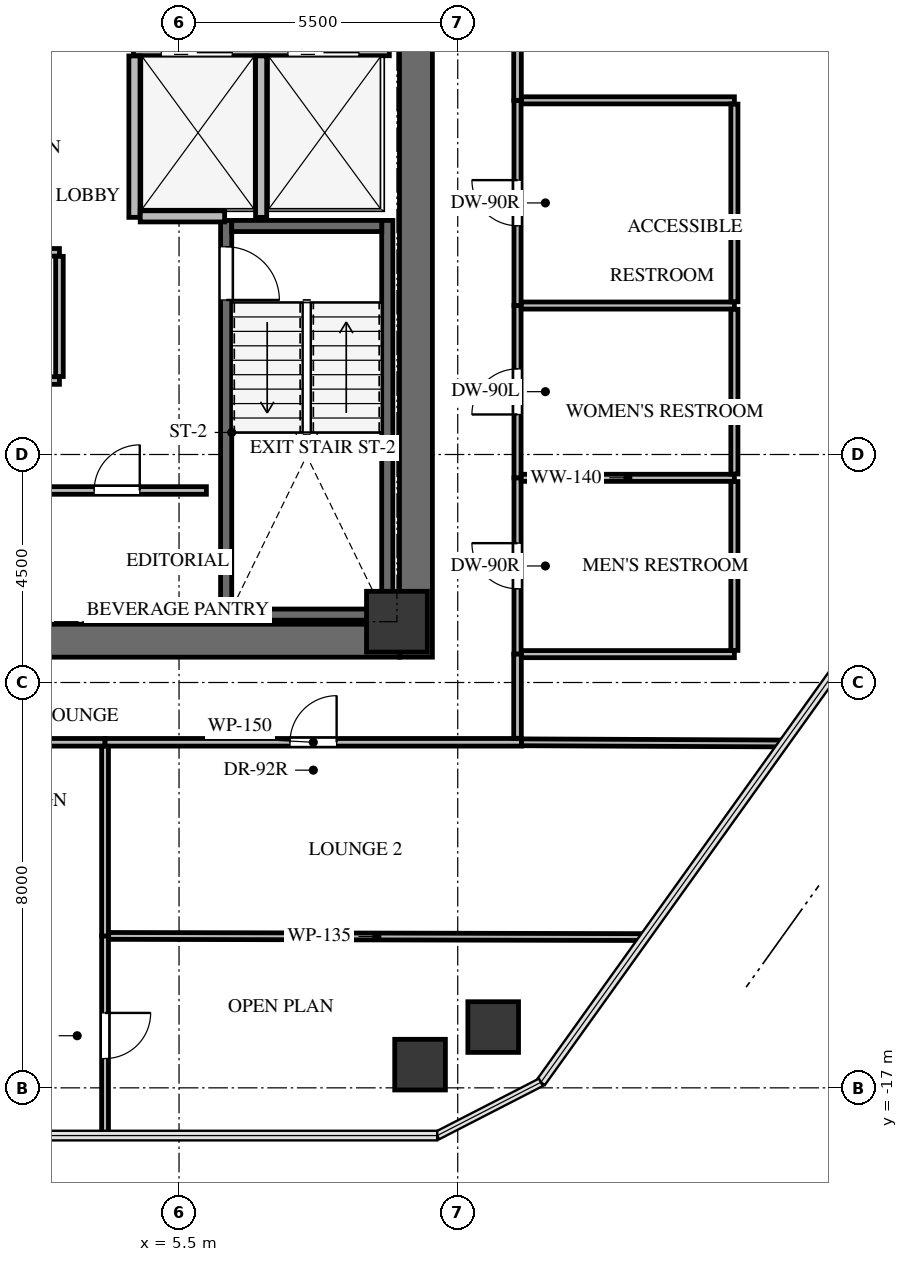
"""IFC4 building model, lengths in metres.
Left out: names, types, materials, properties, quantities, classifications, styles, units other than length and angle.
Written with IfcOpenShell. Run it as: python <this file> out.ifc"""

import sys

from ifc_helpers import new_model, si_unit, direction, frame, frame_2d, origin, origin_2d, place, context, subcontext, project, spatial, rectangle, extrude, source, transform, mapped, element, fill, save


model = new_model("IFC4")
c1 = context("Model", 3, precision=1e-05, world=origin(), true_north=direction((0.0, 1.0)))
c2 = subcontext(c1, "Body", "Model", "MODEL_VIEW")
j1 = project(units=[si_unit("LENGTHUNIT", "METRE"), si_unit("PLANEANGLEUNIT", "RADIAN")], contexts=[c1])
p1 = place(None, origin())
s1 = spatial("IfcSite", under=j1, at=p1, CompositionType="ELEMENT")
p2 = place(p1, origin())
s2 = spatial("IfcBuilding", under=s1, at=p2, CompositionType="ELEMENT")
p3 = place(p2, frame((0.0, 0.0, 183.7)))
s3 = spatial("IfcBuildingStorey", under=s2, at=p3, CompositionType="ELEMENT", Elevation=183.7)
p4 = place(p3, frame((10.175, -8.5, 0.0), z_axis=(0.0, 0.0, 1.0), x_axis=(0.0, 1.0, 0.0)))
e1 = element("IfcWall", 1, at=p4, inside=s3, PredefinedType="SHEAR", context=c2, shape_type="SweptSolid", body=[
    extrude(rectangle(XDim=17.0, YDim=0.65, at=frame_2d((8.5, 0.0))), origin(), (0.0, 0.0, 1.0), 3.3),
])
p5 = place(p3, frame((2.1, -8.175, 0.0), z_axis=(0.0, 0.0, 1.0), x_axis=(1.0, 0.0, 0.0)))
e2 = element("IfcWall", 2, at=p5, inside=s3, PredefinedType="SHEAR", context=c2, shape_type="SweptSolid", body=[
    extrude(rectangle(XDim=7.75, YDim=0.65, at=frame_2d((3.875, 0.0))), origin(), (0.0, 0.0, 1.0), 3.3),
])
p6 = place(p3, frame((9.61, -7.77, -0.24), z_axis=(0.0, 0.0, 1.0), x_axis=(0.0, 1.0, 0.0)))
e3 = element("IfcWall", 3, at=p6, inside=s3, PredefinedType="SHEAR", context=c2, shape_type="SweptSolid", body=[
    extrude(rectangle(XDim=7.89, YDim=0.22, at=frame_2d((3.945, 0.0))), origin(), (0.0, 0.0, 1.0), 3.3),
])
p7 = place(p3, frame((6.43, 0.12, -0.24), z_axis=(0.0, 0.0, 1.0), x_axis=(0.0, -1.0, 0.0)))
e4 = element("IfcWall", 4, at=p7, inside=s3, PredefinedType="SHEAR", context=c2, shape_type="SweptSolid", body=[
    extrude(rectangle(XDim=7.89, YDim=0.22, at=frame_2d((3.945, 0.0))), origin(), (0.0, 0.0, 1.0), 3.3),
])
p8 = place(p7, frame((0.52, 0.0, 0.0)))
e5 = element("IfcOpeningElement", 5, at=p8, cuts=e4, PredefinedType="OPENING", context=c2, shape_type="SweptSolid", body=[
    extrude(rectangle(XDim=1.05, YDim=2.15, at=frame_2d((0.525, 1.075))), frame((0.0, 0.12, 0.0), z_axis=(0.0, -1.0, 0.0), x_axis=(1.0, 0.0, 0.0)), (0.0, 0.0, 1.0), 0.24),
])
for number, where, z_axis, x_axis in (
    (6, (6.54, -7.66, -0.24), (0.0, 0.0, 1.0), (1.0, 0.0, 0.0)),
    (7, (9.5, 0.01, -0.24), (0.0, 0.0, 1.0), (-1.0, 0.0, 0.0)),
):
    element("IfcWall", number, at=place(p3, frame(where, z_axis=z_axis, x_axis=x_axis)), inside=s3, PredefinedType="SHEAR", context=c2, shape_type="SweptSolid", body=[
        extrude(rectangle(XDim=2.96, YDim=0.22, at=frame_2d((1.48, 0.0))), origin(), (0.0, 0.0, 1.0), 3.3),
    ])
m1 = source(origin(), c2, "Body", "SweptSolid", [
    extrude(rectangle(XDim=1.2, YDim=1.2, at=origin_2d()), origin(), (0.0, 0.0, 1.0), 3.3),
])
p9 = place(p3, frame((9.8, -7.8, -0.24), z_axis=(0.0, 0.0, 1.0), x_axis=(1.0, 0.0, 0.0)))
e8 = element("IfcColumn", 8, at=p9, inside=s3, PredefinedType="COLUMN", context=c2, shape_type="MappedRepresentation", body=[
    mapped(m1, transform((0.0, 0.0, 0.0), x_axis=(1.0, 0.0, 0.0), y_axis=(0.0, 1.0, 0.0), z_axis=(0.0, 0.0, 1.0), scale=1.0)),
])
m2 = source(origin(), c2, "Body", "SweptSolid", [
    extrude(rectangle(XDim=1.0, YDim=1.0, at=origin_2d()), origin(), (0.0, 0.0, 1.0), 3.3),
])
for number, where, z_axis, x_axis in (
    (9, (11.7, -15.8, -0.24), (0.0, 0.0, 1.0), (1.0, 0.0, 0.0)),
    (10, (10.257, -16.542, -0.24), (0.0, 0.0, 1.0), (1.0, 0.0, 0.0)),
):
    element("IfcColumn", number, at=place(p3, frame(where, z_axis=z_axis, x_axis=x_axis)), inside=s3, PredefinedType="COLUMN", context=c2, shape_type="MappedRepresentation", body=[
        mapped(m2, transform((0.0, 0.0, 0.0), x_axis=(1.0, 0.0, 0.0), y_axis=(0.0, 1.0, 0.0), z_axis=(0.0, 0.0, 1.0), scale=1.0)),
    ])
p10 = place(p3, frame((4.6, 3.48, 0.0), z_axis=(0.0, 0.0, 1.0), x_axis=(1.0, 0.0, 0.0)))
e11 = element("IfcWall", 11, at=p10, inside=s3, PredefinedType="SOLIDWALL", context=c2, shape_type="SweptSolid", body=[
    extrude(rectangle(XDim=5.05, YDim=0.22, at=frame_2d((2.525, 0.0))), origin(), (0.0, 0.0, 1.0), 3.045),
])
p11 = place(p10, frame((0.55, 0.0, 0.0)))
e12 = element("IfcOpeningElement", 12, at=p11, cuts=e11, PredefinedType="OPENING", context=c2, shape_type="SweptSolid", body=[
    extrude(rectangle(XDim=1.4, YDim=2.15, at=frame_2d((0.7, 1.075))), frame((0.0, 0.12, 0.0), z_axis=(0.0, -1.0, 0.0), x_axis=(1.0, 0.0, 0.0)), (0.0, 0.0, 1.0), 0.24),
])
p12 = place(p10, frame((3.05, 0.0, 0.0)))
e13 = element("IfcOpeningElement", 13, at=p12, cuts=e11, PredefinedType="OPENING", context=c2, shape_type="SweptSolid", body=[
    extrude(rectangle(XDim=1.4, YDim=2.15, at=frame_2d((0.7, 1.075))), frame((0.0, 0.12, 0.0), z_axis=(0.0, -1.0, 0.0), x_axis=(1.0, 0.0, 0.0)), (0.0, 0.0, 1.0), 0.24),
])
for number, where, z_axis, x_axis in (
    (14, (4.62, 0.18, 0.0), (0.0, 0.0, 1.0), (0.0, 1.0, 0.0)),
    (15, (7.12, 0.18, 0.0), (0.0, 0.0, 1.0), (0.0, 1.0, 0.0)),
):
    element("IfcWall", number, at=place(p3, frame(where, z_axis=z_axis, x_axis=x_axis)), inside=s3, PredefinedType="SOLIDWALL", context=c2, shape_type="SweptSolid", body=[
        extrude(rectangle(XDim=3.186, YDim=0.22, at=frame_2d((1.593, 0.0))), origin(), (0.0, 0.0, 1.0), 3.045),
    ])
p13 = place(p3, frame((4.734, 0.2, 0.0), z_axis=(0.0, 0.0, 1.0), x_axis=(1.0, 0.0, 0.0)))
e16 = element("IfcWall", 16, at=p13, inside=s3, PredefinedType="SOLIDWALL", context=c2, shape_type="SweptSolid", body=[
    extrude(rectangle(XDim=1.666, YDim=0.22, at=frame_2d((0.833, 0.0))), origin(), (0.0, 0.0, 1.0), 3.045),
])
p14 = place(p3, frame((2.51, -5.21, 0.0), z_axis=(0.0, 0.0, 1.0), x_axis=(1.0, 0.0, 0.0)))
e17 = element("IfcWall", 17, at=p14, inside=s3, PredefinedType="PARTITIONING", context=c2, shape_type="SweptSolid", body=[
    extrude(rectangle(XDim=3.53, YDim=0.15, at=frame_2d((1.765, 0.0))), origin(), (0.0, 0.0, 1.0), 3.045),
])
p15 = place(p14, frame((1.315, 0.0, 0.0)))
e18 = element("IfcOpeningElement", 18, at=p15, cuts=e17, PredefinedType="OPENING", context=c2, shape_type="SweptSolid", body=[
    extrude(rectangle(XDim=0.9, YDim=2.05, at=frame_2d((0.45, 1.025))), frame((0.0, 0.085, 0.0), z_axis=(0.0, -1.0, 0.0), x_axis=(1.0, 0.0, 0.0)), (0.0, 0.0, 1.0), 0.17),
])
p16 = place(p3, frame((3.14, -3.04, 0.0), z_axis=(0.0, 0.0, 1.0), x_axis=(-1.0, 0.0, 0.0)))
e19 = element("IfcWall", 19, at=p16, inside=s3, PredefinedType="PARTITIONING", context=c2, shape_type="SweptSolid", body=[
    extrude(rectangle(XDim=3.73, YDim=0.15, at=frame_2d((1.865, 0.0))), origin(), (0.0, 0.0, 1.0), 3.045),
])
p17 = place(p16, frame((1.415, 0.0, 0.0)))
e20 = element("IfcOpeningElement", 20, at=p17, cuts=e19, PredefinedType="OPENING", context=c2, shape_type="SweptSolid", body=[
    extrude(rectangle(XDim=0.9, YDim=2.05, at=frame_2d((0.45, 1.025))), frame((0.0, 0.085, 0.0), z_axis=(0.0, -1.0, 0.0), x_axis=(1.0, 0.0, 0.0)), (0.0, 0.0, 1.0), 0.17),
])
p18 = place(p3, frame((-0.59, -0.51, 0.0), z_axis=(0.0, 0.0, 1.0), x_axis=(1.0, 0.0, 0.0)))
e21 = element("IfcWall", 21, at=p18, inside=s3, PredefinedType="PARTITIONING", context=c2, shape_type="SweptSolid", body=[
    extrude(rectangle(XDim=3.73, YDim=0.15, at=frame_2d((1.865, 0.0))), origin(), (0.0, 0.0, 1.0), 3.045),
])
p19 = place(p3, frame((3.14, -0.589, 0.0), z_axis=(0.0, 0.0, 1.0), x_axis=(0.0, -1.0, 0.0)))
e22 = element("IfcWall", 22, at=p19, inside=s3, PredefinedType="PARTITIONING", context=c2, shape_type="SweptSolid", body=[
    extrude(rectangle(XDim=2.372, YDim=0.15, at=frame_2d((1.186, 0.0))), origin(), (0.0, 0.0, 1.0), 3.045),
])
p20 = place(p3, frame((12.18, -8.44, 0.0), z_axis=(0.0, 0.0, 1.0), x_axis=(0.0, 1.0, 0.0)))
e23 = element("IfcWall", 23, at=p20, inside=s3, PredefinedType="PARTITIONING", context=c2, shape_type="SweptSolid", body=[
    extrude(rectangle(XDim=3.48, YDim=0.14, at=frame_2d((1.74, 0.0))), origin(), (0.0, 0.0, 1.0), 3.045),
])
p21 = place(p20, frame((1.29, 0.0, 0.0)))
e24 = element("IfcOpeningElement", 24, at=p21, cuts=e23, PredefinedType="OPENING", context=c2, shape_type="SweptSolid", body=[
    extrude(rectangle(XDim=0.9, YDim=2.05, at=frame_2d((0.45, 1.025))), frame((0.0, 0.08, 0.0), z_axis=(0.0, -1.0, 0.0), x_axis=(1.0, 0.0, 0.0)), (0.0, 0.0, 1.0), 0.16),
])
p22 = place(p3, frame((12.18, -4.96, 0.0), z_axis=(0.0, 0.0, 1.0), x_axis=(0.0, 1.0, 0.0)))
e25 = element("IfcWall", 25, at=p22, inside=s3, PredefinedType="PARTITIONING", context=c2, shape_type="SweptSolid", body=[
    extrude(rectangle(XDim=3.4, YDim=0.14, at=frame_2d((1.7, 0.0))), origin(), (0.0, 0.0, 1.0), 3.045),
])
p23 = place(p22, frame((1.25, 0.0, 0.0)))
e26 = element("IfcOpeningElement", 26, at=p23, cuts=e25, PredefinedType="OPENING", context=c2, shape_type="SweptSolid", body=[
    extrude(rectangle(XDim=0.9, YDim=2.05, at=frame_2d((0.45, 1.025))), frame((0.0, 0.08, 0.0), z_axis=(0.0, -1.0, 0.0), x_axis=(1.0, 0.0, 0.0)), (0.0, 0.0, 1.0), 0.16),
])
p24 = place(p3, frame((12.18, -1.56, 0.0), z_axis=(0.0, 0.0, 1.0), x_axis=(0.0, 1.0, 0.0)))
e27 = element("IfcWall", 27, at=p24, inside=s3, PredefinedType="PARTITIONING", context=c2, shape_type="SweptSolid", body=[
    extrude(rectangle(XDim=4.05, YDim=0.14, at=frame_2d((2.025, 0.0))), origin(), (0.0, 0.0, 1.0), 2.242),
])
p25 = place(p24, frame((1.575, 0.0, 0.0)))
e28 = element("IfcOpeningElement", 28, at=p25, cuts=e27, PredefinedType="OPENING", context=c2, shape_type="SweptSolid", body=[
    extrude(rectangle(XDim=0.9, YDim=2.05, at=frame_2d((0.45, 1.025))), frame((0.0, 0.08, 0.0), z_axis=(0.0, -1.0, 0.0), x_axis=(1.0, 0.0, 0.0)), (0.0, 0.0, 1.0), 0.16),
])
p26 = place(p3, frame((1.089, -10.18, 0.0), z_axis=(0.0, 0.0, 1.0), x_axis=(1.0, 0.0, 0.0)))
e29 = element("IfcWall", 29, at=p26, inside=s3, PredefinedType="PARTITIONING", context=c2, shape_type="SweptSolid", body=[
    extrude(rectangle(XDim=2.951, YDim=0.15, at=frame_2d((1.476, 0.0))), origin(), (0.0, 0.0, 1.0), 3.045),
])
p27 = place(p3, frame((4.04, -10.18, 0.0), z_axis=(0.0, 0.0, 1.0), x_axis=(1.0, 0.0, 0.0)))
e30 = element("IfcWall", 30, at=p27, inside=s3, PredefinedType="PARTITIONING", context=c2, shape_type="SweptSolid", body=[
    extrude(rectangle(XDim=8.22, YDim=0.15, at=frame_2d((4.11, 0.0))), origin(), (0.0, 0.0, 1.0), 2.242),
])
p28 = place(p27, frame((3.65, 0.0, 0.0)))
e31 = element("IfcOpeningElement", 31, at=p28, cuts=e30, PredefinedType="OPENING", context=c2, shape_type="SweptSolid", body=[
    extrude(rectangle(XDim=0.92, YDim=2.1, at=frame_2d((0.46, 1.05))), frame((0.0, 0.085, 0.0), z_axis=(0.0, -1.0, 0.0), x_axis=(1.0, 0.0, 0.0)), (0.0, 0.0, 1.0), 0.17),
])
p29 = place(p3, frame((12.18, 2.49, 0.0), z_axis=(0.0, 0.0, 1.0), x_axis=(0.0, 1.0, 0.0)))
e32 = element("IfcWall", 32, at=p29, inside=s3, PredefinedType="PARTITIONING", context=c2, shape_type="SweptSolid", body=[
    extrude(rectangle(XDim=7.611, YDim=0.15, at=frame_2d((3.806, 0.0))), origin(), (0.0, 0.0, 1.0), 3.045),
])
p30 = place(p29, frame((3.331, 0.0, 0.0)))
e33 = element("IfcOpeningElement", 33, at=p30, cuts=e32, PredefinedType="OPENING", context=c2, shape_type="SweptSolid", body=[
    extrude(rectangle(XDim=0.95, YDim=2.1, at=frame_2d((0.475, 1.05))), frame((0.0, 0.085, 0.0), z_axis=(0.0, -1.0, 0.0), x_axis=(1.0, 0.0, 0.0)), (0.0, 0.0, 1.0), 0.17),
])
p31 = place(p3, frame((12.18, -10.101, 0.0), z_axis=(0.0, 0.0, 1.0), x_axis=(0.0, 1.0, 0.0)))
e34 = element("IfcWall", 34, at=p31, inside=s3, PredefinedType="PARTITIONING", context=c2, shape_type="SweptSolid", body=[
    extrude(rectangle(XDim=1.661, YDim=0.15, at=frame_2d((0.831, 0.0))), origin(), (0.0, 0.0, 1.0), 3.045),
])
p32 = place(p3, frame((12.254, -4.96, 0.0), z_axis=(0.0, 0.0, 1.0), x_axis=(1.0, 0.0, 0.0)))
e35 = element("IfcWall", 35, at=p32, inside=s3, PredefinedType="PARTITIONING", context=c2, shape_type="SweptSolid", body=[
    extrude(rectangle(XDim=4.206, YDim=0.14, at=frame_2d((2.103, 0.0))), origin(), (0.0, 0.0, 1.0), 3.045),
])
p33 = place(p3, frame((16.46, -8.44, 0.0), z_axis=(0.0, 0.0, 1.0), x_axis=(-1.0, 0.0, 0.0)))
e36 = element("IfcWall", 36, at=p33, inside=s3, PredefinedType="PARTITIONING", context=c2, shape_type="SweptSolid", body=[
    extrude(rectangle(XDim=4.201, YDim=0.14, at=frame_2d((2.101, 0.0))), origin(), (0.0, 0.0, 1.0), 3.045),
])
p34 = place(p3, frame((16.46, -5.034, 0.0), z_axis=(0.0, 0.0, 1.0), x_axis=(0.0, -1.0, 0.0)))
e37 = element("IfcWall", 37, at=p34, inside=s3, PredefinedType="PARTITIONING", context=c2, shape_type="SweptSolid", body=[
    extrude(rectangle(XDim=3.332, YDim=0.14, at=frame_2d((1.666, 0.0))), origin(), (0.0, 0.0, 1.0), 3.045),
])
p35 = place(p3, frame((12.254, -1.56, 0.0), z_axis=(0.0, 0.0, 1.0), x_axis=(1.0, 0.0, 0.0)))
e38 = element("IfcWall", 38, at=p35, inside=s3, PredefinedType="PARTITIONING", context=c2, shape_type="SweptSolid", body=[
    extrude(rectangle(XDim=4.206, YDim=0.14, at=frame_2d((2.103, 0.0))), origin(), (0.0, 0.0, 1.0), 3.045),
])
p36 = place(p3, frame((16.46, -1.634, 0.0), z_axis=(0.0, 0.0, 1.0), x_axis=(0.0, -1.0, 0.0)))
e39 = element("IfcWall", 39, at=p36, inside=s3, PredefinedType="PARTITIONING", context=c2, shape_type="SweptSolid", body=[
    extrude(rectangle(XDim=3.252, YDim=0.14, at=frame_2d((1.626, 0.0))), origin(), (0.0, 0.0, 1.0), 3.045),
])
p37 = place(p3, frame((12.259, 2.49, 0.0), z_axis=(0.0, 0.0, 1.0), x_axis=(1.0, 0.0, 0.0)))
e40 = element("IfcWall", 40, at=p37, inside=s3, PredefinedType="PARTITIONING", context=c2, shape_type="SweptSolid", body=[
    extrude(rectangle(XDim=4.201, YDim=0.14, at=frame_2d((2.101, 0.0))), origin(), (0.0, 0.0, 1.0), 3.045),
])
p38 = place(p3, frame((16.46, 2.416, 0.0), z_axis=(0.0, 0.0, 1.0), x_axis=(0.0, -1.0, 0.0)))
e41 = element("IfcWall", 41, at=p38, inside=s3, PredefinedType="PARTITIONING", context=c2, shape_type="SweptSolid", body=[
    extrude(rectangle(XDim=3.902, YDim=0.14, at=frame_2d((1.951, 0.0))), origin(), (0.0, 0.0, 1.0), 2.242),
])
p39 = place(p3, frame((4.04, -14.001, 0.0), z_axis=(0.0, 0.0, 1.0), x_axis=(0.0, -1.0, 0.0)))
e42 = element("IfcWall", 42, at=p39, inside=s3, PredefinedType="PARTITIONING", context=c2, shape_type="SweptSolid", body=[
    extrude(rectangle(XDim=3.941, YDim=0.135, at=frame_2d((1.97, 0.0))), origin(), (0.0, 0.0, 1.0), 2.399),
])
p40 = place(p39, frame((1.521, 0.0, 0.0)))
e43 = element("IfcOpeningElement", 43, at=p40, cuts=e42, PredefinedType="OPENING", context=c2, shape_type="SweptSolid", body=[
    extrude(rectangle(XDim=0.9, YDim=2.05, at=frame_2d((0.45, 1.025))), frame((0.0, 0.078, 0.0), z_axis=(0.0, -1.0, 0.0), x_axis=(1.0, 0.0, 0.0)), (0.0, 0.0, 1.0), 0.155),
])
p41 = place(p3, frame((4.04, -10.259, 0.0), z_axis=(0.0, 0.0, 1.0), x_axis=(0.0, -1.0, 0.0)))
e44 = element("IfcWall", 44, at=p41, inside=s3, PredefinedType="PARTITIONING", context=c2, shape_type="SweptSolid", body=[
    extrude(rectangle(XDim=3.742, YDim=0.135, at=frame_2d((1.871, 0.0))), origin(), (0.0, 0.0, 1.0), 3.045),
])
p42 = place(p3, frame((4.112, -14.001, 0.0), z_axis=(0.0, 0.0, 1.0), x_axis=(0.999997597863, -0.002191864053, 0.0)))
e45 = element("IfcWall", 45, at=p42, inside=s3, PredefinedType="PARTITIONING", context=c2, shape_type="SweptSolid", body=[
    extrude(rectangle(XDim=10.582, YDim=0.135, at=frame_2d((5.291, 0.0))), origin(), (0.0, 0.0, 1.0), 2.242),
])
p43 = place(p3, frame((12.26, -10.18, 0.0), z_axis=(0.0, 0.0, 1.0), x_axis=(0.999990144117, -0.004439782427, 0.0)))
e46 = element("IfcWall", 46, at=p43, inside=s3, PredefinedType="PARTITIONING", context=c2, shape_type="SweptSolid", body=[
    extrude(rectangle(XDim=5.169, YDim=0.135, at=frame_2d((2.584, 0.0))), origin(), (0.0, 0.0, 1.0), 2.399),
])
m3 = source(origin(), c2, "Body", "SweptSolid", [
    extrude(rectangle(XDim=1.05, YDim=2.15, at=frame_2d((0.525, 1.075))), frame((0.0, 0.025, 0.0), z_axis=(0.0, -1.0, 0.0), x_axis=(1.0, 0.0, 0.0)), (0.0, 0.0, 1.0), 0.05),
])
p44 = place(p8, origin())
e47 = element("IfcDoor", 47, at=p44, inside=s3, OperationType="SINGLE_SWING_RIGHT", PredefinedType="DOOR", context=c2, shape_type="MappedRepresentation", body=[
    mapped(m3, transform((0.0, 0.0, 0.0), x_axis=(1.0, 0.0, 0.0), y_axis=(0.0, 1.0, 0.0), z_axis=(0.0, 0.0, 1.0), scale=1.0)),
])
fill(e5, e47)
m4 = source(origin(), c2, "Body", "SweptSolid", [
    extrude(rectangle(XDim=0.9, YDim=2.05, at=frame_2d((0.45, 1.025))), frame((0.0, 0.025, 0.0), z_axis=(0.0, -1.0, 0.0), x_axis=(1.0, 0.0, 0.0)), (0.0, 0.0, 1.0), 0.05),
])
p45 = place(p15, origin())
e48 = element("IfcDoor", 48, at=p45, inside=s3, OperationType="SINGLE_SWING_RIGHT", PredefinedType="DOOR", context=c2, shape_type="MappedRepresentation", body=[
    mapped(m4, transform((0.0, 0.0, 0.0), x_axis=(1.0, 0.0, 0.0), y_axis=(0.0, 1.0, 0.0), z_axis=(0.0, 0.0, 1.0), scale=1.0)),
])
fill(e18, e48)
m5 = source(origin(), c2, "Body", "SweptSolid", [
    extrude(rectangle(XDim=0.9, YDim=2.05, at=frame_2d((0.45, 1.025))), frame((0.0, 0.025, 0.0), z_axis=(0.0, -1.0, 0.0), x_axis=(1.0, 0.0, 0.0)), (0.0, 0.0, 1.0), 0.05),
])
p46 = place(p21, origin())
e49 = element("IfcDoor", 49, at=p46, inside=s3, OperationType="SINGLE_SWING_RIGHT", PredefinedType="DOOR", context=c2, shape_type="MappedRepresentation", body=[
    mapped(m5, transform((0.0, 0.0, 0.0), x_axis=(1.0, 0.0, 0.0), y_axis=(0.0, 1.0, 0.0), z_axis=(0.0, 0.0, 1.0), scale=1.0)),
])
fill(e24, e49)
m6 = source(origin(), c2, "Body", "SweptSolid", [
    extrude(rectangle(XDim=0.9, YDim=2.05, at=frame_2d((0.45, 1.025))), frame((0.0, 0.025, 0.0), z_axis=(0.0, -1.0, 0.0), x_axis=(1.0, 0.0, 0.0)), (0.0, 0.0, 1.0), 0.05),
])
p47 = place(p23, origin())
e50 = element("IfcDoor", 50, at=p47, inside=s3, OperationType="SINGLE_SWING_LEFT", PredefinedType="DOOR", context=c2, shape_type="MappedRepresentation", body=[
    mapped(m6, transform((0.0, 0.0, 0.0), x_axis=(1.0, 0.0, 0.0), y_axis=(0.0, 1.0, 0.0), z_axis=(0.0, 0.0, 1.0), scale=1.0)),
])
fill(e26, e50)
p48 = place(p25, origin())
e51 = element("IfcDoor", 51, at=p48, inside=s3, OperationType="SINGLE_SWING_RIGHT", PredefinedType="DOOR", context=c2, shape_type="MappedRepresentation", body=[
    mapped(m5, transform((0.0, 0.0, 0.0), x_axis=(1.0, 0.0, 0.0), y_axis=(0.0, 1.0, 0.0), z_axis=(0.0, 0.0, 1.0), scale=1.0)),
])
fill(e28, e51)
m7 = source(origin(), c2, "Body", "SweptSolid", [
    extrude(rectangle(XDim=0.92, YDim=2.1, at=frame_2d((0.46, 1.05))), frame((0.0, 0.025, 0.0), z_axis=(0.0, -1.0, 0.0), x_axis=(1.0, 0.0, 0.0)), (0.0, 0.0, 1.0), 0.05),
])
p49 = place(p28, origin())
e52 = element("IfcDoor", 52, at=p49, inside=s3, OperationType="SINGLE_SWING_RIGHT", PredefinedType="DOOR", context=c2, shape_type="MappedRepresentation", body=[
    mapped(m7, transform((0.0, 0.0, 0.0), x_axis=(1.0, 0.0, 0.0), y_axis=(0.0, 1.0, 0.0), z_axis=(0.0, 0.0, 1.0), scale=1.0)),
])
fill(e31, e52)
p50 = place(p40, origin())
e53 = element("IfcDoor", 53, at=p50, inside=s3, OperationType="SINGLE_SWING_LEFT", PredefinedType="DOOR", context=c2, shape_type="MappedRepresentation", body=[
    mapped(m6, transform((0.0, 0.0, 0.0), x_axis=(1.0, 0.0, 0.0), y_axis=(0.0, 1.0, 0.0), z_axis=(0.0, 0.0, 1.0), scale=1.0)),
])
fill(e43, e53)
save(model, sys.argv[1])
